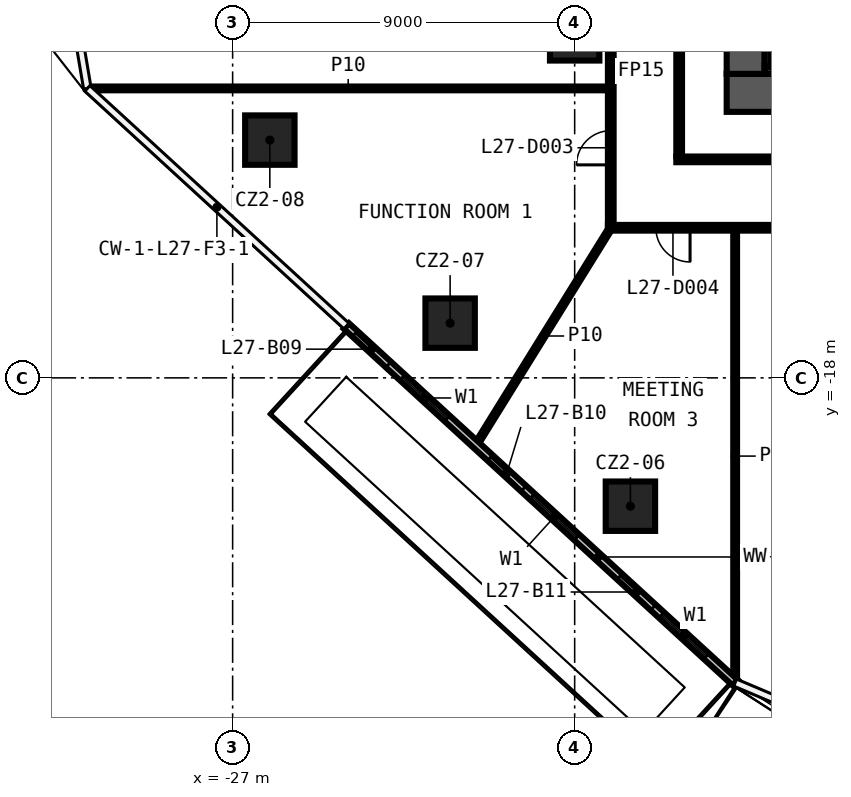
"""IFC4 building model, lengths in metres.
Left out: names, types, materials, properties, quantities, classifications, styles, units other than length and angle.
Written with IfcOpenShell. Run it as: python <this file> out.ifc"""

import sys

from ifc_helpers import new_model, si_unit, direction, frame, frame_2d, origin, origin_2d, place, context, subcontext, project, spatial, rectangle, extrude, element, fill, save


model = new_model("IFC4")
c1 = context("Model", 3, precision=1e-05, world=origin(), true_north=direction((0.0, 1.0)))
c2 = subcontext(c1, "Body", "Model", "MODEL_VIEW")
j1 = project(units=[si_unit("LENGTHUNIT", "METRE"), si_unit("PLANEANGLEUNIT", "RADIAN")], contexts=[c1])
p1 = place(None, origin())
s1 = spatial("IfcSite", under=j1, at=p1, CompositionType="ELEMENT")
p2 = place(p1, origin())
s2 = spatial("IfcBuilding", under=s1, at=p2, CompositionType="ELEMENT")
p3 = place(p2, frame((0.0, 0.0, 124.8)))
s3 = spatial("IfcBuildingStorey", under=s2, at=p3, CompositionType="ELEMENT", Elevation=124.8)
for number, where, z_axis, x_axis in (
    (1, (-16.533, -21.377, 0.0), (0.0, 0.0, 1.0), (1.0, 0.0, 0.0)),
    (2, (-21.277, -16.56, 0.0), (0.0, 0.0, 1.0), (1.0, 0.0, 0.0)),
    (3, (-26.021, -11.743, 0.0), (0.0, 0.0, 1.0), (1.0, 0.0, 0.0)),
    (4, (-18.0, -9.0, 0.0), (0.0, 0.0, 1.0), (1.0, 0.0, 0.0)),
):
    element("IfcColumn", number, at=place(p3, frame(where, z_axis=z_axis, x_axis=x_axis)), inside=s3, PredefinedType="COLUMN", context=c2, shape_type="SweptSolid", body=[
        extrude(rectangle(XDim=1.3, YDim=1.3, at=origin_2d()), origin(), (0.0, 0.0, 1.0), 3.3),
    ])
p4 = place(p3, frame((17.125, -14.05, 0.0), z_axis=(0.0, 0.0, 1.0), x_axis=(-1.0, 0.0, 0.0)))
e5 = element("IfcWall", 5, at=p4, inside=s3, PredefinedType="PARTITIONING", context=c2, shape_type="SweptSolid", body=[
    extrude(rectangle(XDim=34.25, YDim=0.15, at=frame_2d((17.125, 0.0))), origin(), (0.0, 0.0, 1.0), 3.3),
])
p5 = place(p4, frame((32.089, 0.0, 0.0)))
e6 = element("IfcOpeningElement", 6, at=p5, cuts=e5, PredefinedType="OPENING", context=c2, shape_type="SweptSolid", body=[
    extrude(rectangle(XDim=0.9, YDim=2.1, at=frame_2d((0.45, 1.05))), frame((0.0, 0.085, 0.0), z_axis=(0.0, -1.0, 0.0), x_axis=(1.0, 0.0, 0.0)), (0.0, 0.0, 1.0), 0.17),
])
p6 = place(p4, frame((25.666, 0.0, 0.0)))
e7 = element("IfcOpeningElement", 7, at=p6, cuts=e5, PredefinedType="OPENING", context=c2, shape_type="SweptSolid", body=[
    extrude(rectangle(XDim=1.0, YDim=2.1, at=frame_2d((0.5, 1.05))), frame((0.0, 0.085, 0.0), z_axis=(0.0, -1.0, 0.0), x_axis=(1.0, 0.0, 0.0)), (0.0, 0.0, 1.0), 0.17),
])
p7 = place(p4, frame((18.714, 0.0, 0.0)))
e8 = element("IfcOpeningElement", 8, at=p7, cuts=e5, PredefinedType="OPENING", context=c2, shape_type="SweptSolid", body=[
    extrude(rectangle(XDim=1.0, YDim=2.1, at=frame_2d((0.5, 1.05))), frame((0.0, 0.085, 0.0), z_axis=(0.0, -1.0, 0.0), x_axis=(1.0, 0.0, 0.0)), (0.0, 0.0, 1.0), 0.17),
])
p8 = place(p4, frame((16.558, 0.0, 0.0)))
e9 = element("IfcOpeningElement", 9, at=p8, cuts=e5, PredefinedType="OPENING", context=c2, shape_type="SweptSolid", body=[
    extrude(rectangle(XDim=1.0, YDim=2.1, at=frame_2d((0.5, 1.05))), frame((0.0, 0.085, 0.0), z_axis=(0.0, -1.0, 0.0), x_axis=(1.0, 0.0, 0.0)), (0.0, 0.0, 1.0), 0.17),
])
p9 = place(p4, frame((9.602, 0.0, 0.0)))
e10 = element("IfcOpeningElement", 10, at=p9, cuts=e5, PredefinedType="OPENING", context=c2, shape_type="SweptSolid", body=[
    extrude(rectangle(XDim=1.0, YDim=2.1, at=frame_2d((0.5, 1.05))), frame((0.0, 0.085, 0.0), z_axis=(0.0, -1.0, 0.0), x_axis=(1.0, 0.0, 0.0)), (0.0, 0.0, 1.0), 0.17),
])
p10 = place(p4, frame((7.451, 0.0, 0.0)))
e11 = element("IfcOpeningElement", 11, at=p10, cuts=e5, PredefinedType="OPENING", context=c2, shape_type="SweptSolid", body=[
    extrude(rectangle(XDim=1.0, YDim=2.1, at=frame_2d((0.5, 1.05))), frame((0.0, 0.085, 0.0), z_axis=(0.0, -1.0, 0.0), x_axis=(1.0, 0.0, 0.0)), (0.0, 0.0, 1.0), 0.17),
])
p11 = place(p4, frame((0.576, 0.0, 0.0)))
e12 = element("IfcOpeningElement", 12, at=p11, cuts=e5, PredefinedType="OPENING", context=c2, shape_type="SweptSolid", body=[
    extrude(rectangle(XDim=1.0, YDim=2.1, at=frame_2d((0.5, 1.05))), frame((0.0, 0.085, 0.0), z_axis=(0.0, -1.0, 0.0), x_axis=(1.0, 0.0, 0.0)), (0.0, 0.0, 1.0), 0.17),
])
p12 = place(p3, frame((-15.325, -12.25, 0.0), z_axis=(0.0, 0.0, 1.0), x_axis=(1.0, 0.0, 0.0)))
e13 = element("IfcWall", 13, at=p12, inside=s3, PredefinedType="PARTITIONING", context=c2, shape_type="SweptSolid", body=[
    extrude(rectangle(XDim=22.6, YDim=0.15, at=frame_2d((11.3, 0.0))), origin(), (0.0, 0.0, 1.0), 3.3),
])
p13 = place(p3, frame((-30.793, -10.383, 0.0), z_axis=(0.0, 0.0, 1.0), x_axis=(1.0, 0.0, 0.0)))
e14 = element("IfcWall", 14, at=p13, inside=s3, PredefinedType="PARTITIONING", context=c2, shape_type="SweptSolid", body=[
    extrude(rectangle(XDim=13.668, YDim=0.1, at=frame_2d((6.834, 0.0))), origin(), (0.0, 0.0, 1.0), 3.3),
])
p14 = place(p3, frame((-20.585, -19.747, 0.0), z_axis=(0.0, 0.0, 1.0), x_axis=(0.527253174698, 0.849708238027, 0.0)))
e15 = element("IfcWall", 15, at=p14, inside=s3, PredefinedType="PARTITIONING", context=c2, shape_type="SweptSolid", body=[
    extrude(rectangle(XDim=6.704, YDim=0.1, at=frame_2d((3.352, 0.0))), origin(), (0.0, 0.0, 1.0), 3.3),
])
p15 = place(p3, frame((-13.777, -25.992, 0.0), z_axis=(0.0, 0.0, 1.0), x_axis=(0.0, 1.0, 0.0)))
e16 = element("IfcWall", 16, at=p15, inside=s3, PredefinedType="PARTITIONING", context=c2, shape_type="SweptSolid", body=[
    extrude(rectangle(XDim=11.867, YDim=0.1, at=frame_2d((5.933, 0.0))), origin(), (0.0, 0.0, 1.0), 3.3),
])
p16 = place(p3, frame((-15.25, 12.175, 0.0), z_axis=(0.0, 0.0, 1.0), x_axis=(0.0, -1.0, 0.0)))
e17 = element("IfcWall", 17, at=p16, inside=s3, PredefinedType="PARTITIONING", context=c2, shape_type="SweptSolid", body=[
    extrude(rectangle(XDim=24.35, YDim=0.15, at=frame_2d((12.175, 0.0))), origin(), (0.0, 0.0, 1.0), 3.3),
])
p17 = place(p16, frame((11.725, 0.0, 0.0)))
e18 = element("IfcOpeningElement", 18, at=p17, cuts=e17, PredefinedType="OPENING", context=c2, shape_type="SweptSolid", body=[
    extrude(rectangle(XDim=0.9, YDim=2.1, at=frame_2d((0.45, 1.05))), frame((0.0, 0.085, 0.0), z_axis=(0.0, -1.0, 0.0), x_axis=(1.0, 0.0, 0.0)), (0.0, 0.0, 1.0), 0.17),
])
p18 = place(p3, frame((-17.05, -13.975, 0.0), z_axis=(0.0, 0.0, 1.0), x_axis=(0.0, 1.0, 0.0)))
e19 = element("IfcWall", 19, at=p18, inside=s3, PredefinedType="PARTITIONING", context=c2, shape_type="SweptSolid", body=[
    extrude(rectangle(XDim=27.95, YDim=0.15, at=frame_2d((13.975, 0.0))), origin(), (0.0, 0.0, 1.0), 3.3),
])
p19 = place(p18, frame((11.186, 0.0, 0.0)))
e20 = element("IfcOpeningElement", 20, at=p19, cuts=e19, PredefinedType="OPENING", context=c2, shape_type="SweptSolid", body=[
    extrude(rectangle(XDim=0.9, YDim=2.1, at=frame_2d((0.45, 1.05))), frame((0.0, 0.085, 0.0), z_axis=(0.0, -1.0, 0.0), x_axis=(1.0, 0.0, 0.0)), (0.0, 0.0, 1.0), 0.17),
])
p20 = place(p18, frame((8.404, 0.0, 0.0)))
e21 = element("IfcOpeningElement", 21, at=p20, cuts=e19, PredefinedType="OPENING", context=c2, shape_type="SweptSolid", body=[
    extrude(rectangle(XDim=0.9, YDim=2.1, at=frame_2d((0.45, 1.05))), frame((0.0, 0.085, 0.0), z_axis=(0.0, -1.0, 0.0), x_axis=(1.0, 0.0, 0.0)), (0.0, 0.0, 1.0), 0.17),
])
p21 = place(p18, frame((1.58, 0.0, 0.0)))
e22 = element("IfcOpeningElement", 22, at=p21, cuts=e19, PredefinedType="OPENING", context=c2, shape_type="SweptSolid", body=[
    extrude(rectangle(XDim=0.9, YDim=2.1, at=frame_2d((0.45, 1.05))), frame((0.0, 0.085, 0.0), z_axis=(0.0, -1.0, 0.0), x_axis=(1.0, 0.0, 0.0)), (0.0, 0.0, 1.0), 0.17),
])
p22 = place(p18, frame((24.871, 0.0, 0.0)))
e23 = element("IfcOpeningElement", 23, at=p22, cuts=e19, PredefinedType="OPENING", context=c2, shape_type="SweptSolid", body=[
    extrude(rectangle(XDim=0.9, YDim=2.1, at=frame_2d((0.45, 1.05))), frame((0.0, 0.085, 0.0), z_axis=(0.0, -1.0, 0.0), x_axis=(1.0, 0.0, 0.0)), (0.0, 0.0, 1.0), 0.17),
])
p23 = place(p18, frame((20.159, 0.0, 0.0)))
e24 = element("IfcOpeningElement", 24, at=p23, cuts=e19, PredefinedType="OPENING", context=c2, shape_type="SweptSolid", body=[
    extrude(rectangle(XDim=0.9, YDim=2.1, at=frame_2d((0.45, 1.05))), frame((0.0, 0.085, 0.0), z_axis=(0.0, -1.0, 0.0), x_axis=(1.0, 0.0, 0.0)), (0.0, 0.0, 1.0), 0.17),
])
p24 = place(p18, frame((16.211, 0.0, 0.0)))
e25 = element("IfcOpeningElement", 25, at=p24, cuts=e19, PredefinedType="OPENING", context=c2, shape_type="SweptSolid", body=[
    extrude(rectangle(XDim=0.9, YDim=2.1, at=frame_2d((0.45, 1.05))), frame((0.0, 0.085, 0.0), z_axis=(0.0, -1.0, 0.0), x_axis=(1.0, 0.0, 0.0)), (0.0, 0.0, 1.0), 0.17),
])
p25 = place(p3, frame((-24.006, -16.636, 0.0), z_axis=(0.0, 0.0, 1.0), x_axis=(0.736923378069, -0.675976282761, 0.0)))
e26 = element("IfcWall", 26, at=p25, inside=s3, PredefinedType="SOLIDWALL", context=c2, shape_type="SweptSolid", body=[
    extrude(rectangle(XDim=13.88, YDim=0.2, at=frame_2d((6.94, 0.0))), origin(), (0.0, 0.0, 1.0), 3.3),
])
p26 = place(p25, frame((2.0, 0.0, 0.6)))
e27 = element("IfcOpeningElement", 27, at=p26, cuts=e26, PredefinedType="OPENING", context=c2, shape_type="SweptSolid", body=[
    extrude(rectangle(XDim=1.6, YDim=2.4, at=frame_2d((0.8, 1.2))), frame((0.0, 0.11, 0.0), z_axis=(0.0, -1.0, 0.0), x_axis=(1.0, 0.0, 0.0)), (0.0, 0.0, 1.0), 0.22),
])
p27 = place(p25, frame((0.3, 0.0, 0.0)))
e28 = element("IfcOpeningElement", 28, at=p27, cuts=e26, PredefinedType="OPENING", context=c2, shape_type="SweptSolid", body=[
    extrude(rectangle(XDim=1.2, YDim=2.4, at=frame_2d((0.6, 1.2))), frame((0.0, 0.11, 0.0), z_axis=(0.0, -1.0, 0.0), x_axis=(1.0, 0.0, 0.0)), (0.0, 0.0, 1.0), 0.22),
])
p28 = place(p25, frame((6.627, 0.0, 0.6)))
e29 = element("IfcOpeningElement", 29, at=p28, cuts=e26, PredefinedType="OPENING", context=c2, shape_type="SweptSolid", body=[
    extrude(rectangle(XDim=1.6, YDim=2.4, at=frame_2d((0.8, 1.2))), frame((0.0, 0.11, 0.0), z_axis=(0.0, -1.0, 0.0), x_axis=(1.0, 0.0, 0.0)), (0.0, 0.0, 1.0), 0.22),
])
p29 = place(p25, frame((5.127, 0.0, 0.0)))
e30 = element("IfcOpeningElement", 30, at=p29, cuts=e26, PredefinedType="OPENING", context=c2, shape_type="SweptSolid", body=[
    extrude(rectangle(XDim=1.2, YDim=2.4, at=frame_2d((0.6, 1.2))), frame((0.0, 0.11, 0.0), z_axis=(0.0, -1.0, 0.0), x_axis=(1.0, 0.0, 0.0)), (0.0, 0.0, 1.0), 0.22),
])
p30 = place(p25, frame((11.253, 0.0, 0.6)))
e31 = element("IfcOpeningElement", 31, at=p30, cuts=e26, PredefinedType="OPENING", context=c2, shape_type="SweptSolid", body=[
    extrude(rectangle(XDim=1.6, YDim=2.4, at=frame_2d((0.8, 1.2))), frame((0.0, 0.11, 0.0), z_axis=(0.0, -1.0, 0.0), x_axis=(1.0, 0.0, 0.0)), (0.0, 0.0, 1.0), 0.22),
])
p31 = place(p25, frame((9.753, 0.0, 0.0)))
e32 = element("IfcOpeningElement", 32, at=p31, cuts=e26, PredefinedType="OPENING", context=c2, shape_type="SweptSolid", body=[
    extrude(rectangle(XDim=1.2, YDim=2.4, at=frame_2d((0.6, 1.2))), frame((0.0, 0.11, 0.0), z_axis=(0.0, -1.0, 0.0), x_axis=(1.0, 0.0, 0.0)), (0.0, 0.0, 1.0), 0.22),
])
p32 = place(p3, frame((14.0, -10.5, 0.0), z_axis=(0.0, 0.0, 1.0), x_axis=(-1.0, 0.0, 0.0)))
e33 = element("IfcWall", 33, at=p32, inside=s3, PredefinedType="SHEAR", context=c2, shape_type="SweptSolid", body=[
    extrude(rectangle(XDim=28.0, YDim=1.0, at=frame_2d((14.0, 0.0))), origin(), (0.0, 0.0, 1.0), 3.3),
])
p33 = place(p32, frame((5.1, 0.0, 0.0)))
e34 = element("IfcOpeningElement", 34, at=p33, cuts=e33, PredefinedType="OPENING", context=c2, shape_type="SweptSolid", body=[
    extrude(rectangle(XDim=1.6, YDim=2.1, at=frame_2d((0.8, 1.05))), frame((0.0, 0.51, 0.0), z_axis=(0.0, -1.0, 0.0), x_axis=(1.0, 0.0, 0.0)), (0.0, 0.0, 1.0), 1.02),
])
p34 = place(p3, frame((-13.5, -10.0, 0.0), z_axis=(0.0, 0.0, 1.0), x_axis=(0.0, 1.0, 0.0)))
e35 = element("IfcWall", 35, at=p34, inside=s3, PredefinedType="SHEAR", context=c2, shape_type="SweptSolid", body=[
    extrude(rectangle(XDim=20.0, YDim=1.0, at=frame_2d((10.0, 0.0))), origin(), (0.0, 0.0, 1.0), 3.3),
])
p35 = place(p3, frame((6.9, -9.9, 0.0), z_axis=(0.0, 0.0, 1.0), x_axis=(-1.0, 0.0, 0.0)))
e36 = element("IfcWall", 36, at=p35, inside=s3, PredefinedType="SHEAR", context=c2, shape_type="SweptSolid", body=[
    extrude(rectangle(XDim=19.9, YDim=0.2, at=frame_2d((9.95, 0.0))), origin(), (0.0, 0.0, 1.0), 3.3),
])
p36 = place(p3, frame((-12.9, -9.8, 0.0), z_axis=(0.0, 0.0, 1.0), x_axis=(0.0, 1.0, 0.0)))
e37 = element("IfcWall", 37, at=p36, inside=s3, PredefinedType="SHEAR", context=c2, shape_type="SweptSolid", body=[
    extrude(rectangle(XDim=19.6, YDim=0.2, at=frame_2d((9.8, 0.0))), origin(), (0.0, 0.0, 1.0), 3.3),
])
p37 = place(p21, origin())
e38 = element("IfcDoor", 38, at=p37, inside=s3, OperationType="SINGLE_SWING_LEFT", PredefinedType="DOOR", context=c2, shape_type="SweptSolid", body=[
    extrude(rectangle(XDim=0.9, YDim=2.1, at=frame_2d((0.45, 1.05))), frame((0.0, 0.025, 0.0), z_axis=(0.0, -1.0, 0.0), x_axis=(1.0, 0.0, 0.0)), (0.0, 0.0, 1.0), 0.05),
])
fill(e22, e38)
p38 = place(p5, origin())
e39 = element("IfcDoor", 39, at=p38, inside=s3, OperationType="SINGLE_SWING_RIGHT", PredefinedType="DOOR", context=c2, shape_type="SweptSolid", body=[
    extrude(rectangle(XDim=0.9, YDim=2.1, at=frame_2d((0.45, 1.05))), frame((0.0, 0.025, 0.0), z_axis=(0.0, -1.0, 0.0), x_axis=(1.0, 0.0, 0.0)), (0.0, 0.0, 1.0), 0.05),
])
fill(e6, e39)
p39 = place(p26, origin())
e40 = element("IfcWindow", 40, at=p39, inside=s3, PartitioningType="SINGLE_PANEL", PredefinedType="WINDOW", context=c2, shape_type="SweptSolid", body=[
    extrude(rectangle(XDim=1.6, YDim=2.4, at=frame_2d((0.8, 1.2))), frame((0.0, 0.03, 0.0), z_axis=(0.0, -1.0, 0.0), x_axis=(1.0, 0.0, 0.0)), (0.0, 0.0, 1.0), 0.06),
])
fill(e27, e40)
p40 = place(p27, origin())
e41 = element("IfcDoor", 41, at=p40, inside=s3, OperationType="SLIDING_TO_LEFT", PredefinedType="DOOR", context=c2, shape_type="SweptSolid", body=[
    extrude(rectangle(XDim=1.2, YDim=2.4, at=frame_2d((0.6, 1.2))), frame((0.0, 0.025, 0.0), z_axis=(0.0, -1.0, 0.0), x_axis=(1.0, 0.0, 0.0)), (0.0, 0.0, 1.0), 0.05),
])
fill(e28, e41)
p41 = place(p28, origin())
e42 = element("IfcWindow", 42, at=p41, inside=s3, PartitioningType="SINGLE_PANEL", PredefinedType="WINDOW", context=c2, shape_type="SweptSolid", body=[
    extrude(rectangle(XDim=1.6, YDim=2.4, at=frame_2d((0.8, 1.2))), frame((0.0, 0.03, 0.0), z_axis=(0.0, -1.0, 0.0), x_axis=(1.0, 0.0, 0.0)), (0.0, 0.0, 1.0), 0.06),
])
fill(e29, e42)
p42 = place(p29, origin())
e43 = element("IfcDoor", 43, at=p42, inside=s3, OperationType="SLIDING_TO_LEFT", PredefinedType="DOOR", context=c2, shape_type="SweptSolid", body=[
    extrude(rectangle(XDim=1.2, YDim=2.4, at=frame_2d((0.6, 1.2))), frame((0.0, 0.025, 0.0), z_axis=(0.0, -1.0, 0.0), x_axis=(1.0, 0.0, 0.0)), (0.0, 0.0, 1.0), 0.05),
])
fill(e30, e43)
p43 = place(p30, origin())
e44 = element("IfcWindow", 44, at=p43, inside=s3, PartitioningType="SINGLE_PANEL", PredefinedType="WINDOW", context=c2, shape_type="SweptSolid", body=[
    extrude(rectangle(XDim=1.6, YDim=2.4, at=frame_2d((0.8, 1.2))), frame((0.0, 0.03, 0.0), z_axis=(0.0, -1.0, 0.0), x_axis=(1.0, 0.0, 0.0)), (0.0, 0.0, 1.0), 0.06),
])
fill(e31, e44)
p44 = place(p31, origin())
e45 = element("IfcDoor", 45, at=p44, inside=s3, OperationType="SLIDING_TO_LEFT", PredefinedType="DOOR", context=c2, shape_type="SweptSolid", body=[
    extrude(rectangle(XDim=1.2, YDim=2.4, at=frame_2d((0.6, 1.2))), frame((0.0, 0.025, 0.0), z_axis=(0.0, -1.0, 0.0), x_axis=(1.0, 0.0, 0.0)), (0.0, 0.0, 1.0), 0.05),
])
fill(e32, e45)
save(model, sys.argv[1])
